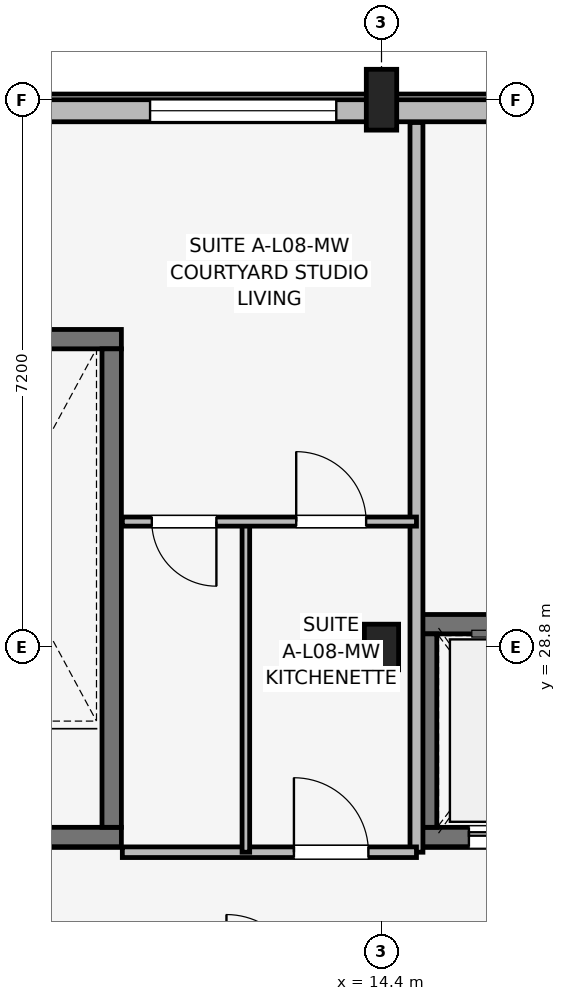
"""IFC4 building model, lengths in metres.
Left out: names, types, materials, properties, quantities, classifications, styles, units other than length and angle.
Written with IfcOpenShell. Run it as: python <this file> out.ifc"""

import sys

from ifc_helpers import new_model, si_unit, direction, frame, frame_2d, origin, origin_2d, place, context, subcontext, project, spatial, rectangle, extrude, element, fill, save


model = new_model("IFC4")
c1 = context("Model", 3, precision=1e-05, world=origin(), true_north=direction((0.0, 1.0)))
c2 = subcontext(c1, "Body", "Model", "MODEL_VIEW")
j1 = project(units=[si_unit("LENGTHUNIT", "METRE"), si_unit("PLANEANGLEUNIT", "RADIAN")], contexts=[c1])
p1 = place(None, origin())
s1 = spatial("IfcSite", under=j1, at=p1, CompositionType="ELEMENT")
p2 = place(p1, origin())
s2 = spatial("IfcBuilding", under=s1, at=p2, CompositionType="ELEMENT")
p3 = place(p2, frame((0.0, 0.0, 27.6)))
s3 = spatial("IfcBuildingStorey", under=s2, at=p3, CompositionType="ELEMENT", Elevation=27.6)
p4 = place(p3, frame((14.4, 28.8, 0.0), z_axis=(0.0, 0.0, 1.0), x_axis=(1.0, 0.0, 0.0)))
e1 = element("IfcColumn", 1, at=p4, inside=s3, PredefinedType="COLUMN", context=c2, shape_type="SweptSolid", body=[
    extrude(rectangle(XDim=0.45, YDim=0.6, at=origin_2d()), origin(), (0.0, 0.0, 1.0), 3.15),
])
p5 = place(p3, frame((14.4, 36.0, 0.0), z_axis=(0.0, 0.0, 1.0), x_axis=(1.0, 0.0, 0.0)))
e2 = element("IfcColumn", 2, at=p5, inside=s3, PredefinedType="COLUMN", context=c2, shape_type="SweptSolid", body=[
    extrude(rectangle(XDim=0.4, YDim=0.8, at=origin_2d()), origin(), (0.0, 0.0, 1.0), 3.15),
])
p6 = place(p3, frame((7.673, 26.3, 0.0), z_axis=(0.0, 0.0, 1.0), x_axis=(1.0, 0.0, 0.0)))
e3 = element("IfcWall", 3, at=p6, inside=s3, PredefinedType="SHEAR", context=c2, shape_type="SweptSolid", body=[
    extrude(rectangle(XDim=3.305, YDim=0.255, at=frame_2d((1.652, 0.0))), origin(), (0.0, 0.0, 1.0), 3.15),
])
p7 = place(p6, frame((2.177, 0.0, 0.0), z_axis=(0.0, 0.0, 1.0), x_axis=(-1.0, 0.0, 0.0)))
e4 = element("IfcOpeningElement", 4, at=p7, cuts=e3, PredefinedType="OPENING", context=c2, shape_type="SweptSolid", body=[
    extrude(rectangle(XDim=1.05, YDim=2.12, at=frame_2d((0.525, 1.06))), frame((0.0, 0.137, 0.0), z_axis=(0.0, -1.0, 0.0), x_axis=(1.0, 0.0, 0.0)), (0.0, 0.0, 1.0), 0.275),
])
p8 = place(p3, frame((7.673, 32.85, 0.0), z_axis=(0.0, 0.0, 1.0), x_axis=(1.0, 0.0, 0.0)))
e5 = element("IfcWall", 5, at=p8, inside=s3, PredefinedType="SHEAR", context=c2, shape_type="SweptSolid", body=[
    extrude(rectangle(XDim=3.305, YDim=0.255, at=frame_2d((1.652, 0.0))), origin(), (0.0, 0.0, 1.0), 3.15),
])
p9 = place(p3, frame((10.85, 26.427, 0.0), z_axis=(0.0, 0.0, 1.0), x_axis=(0.0, 1.0, 0.0)))
e6 = element("IfcWall", 6, at=p9, inside=s3, PredefinedType="SHEAR", context=c2, shape_type="SweptSolid", body=[
    extrude(rectangle(XDim=6.295, YDim=0.255, at=frame_2d((3.147, 0.0))), origin(), (0.0, 0.0, 1.0), 3.15),
])
p10 = place(p3, frame((14.873, 26.3, 0.0), z_axis=(0.0, 0.0, 1.0), x_axis=(1.0, 0.0, 0.0)))
e7 = element("IfcWall", 7, at=p10, inside=s3, PredefinedType="SHEAR", context=c2, shape_type="SweptSolid", body=[
    extrude(rectangle(XDim=2.455, YDim=0.255, at=frame_2d((1.228, 0.0))), origin(), (0.0, 0.0, 1.0), 3.15),
])
p11 = place(p10, frame((0.677, 0.0, 0.0)))
e8 = element("IfcOpeningElement", 8, at=p11, cuts=e7, PredefinedType="OPENING", context=c2, shape_type="SweptSolid", body=[
    extrude(rectangle(XDim=1.1, YDim=2.15, at=frame_2d((0.55, 1.075))), frame((0.0, 0.137, 0.0), z_axis=(0.0, -1.0, 0.0), x_axis=(1.0, 0.0, 0.0)), (0.0, 0.0, 1.0), 0.275),
])
p12 = place(p3, frame((14.873, 29.1, 0.0), z_axis=(0.0, 0.0, 1.0), x_axis=(1.0, 0.0, 0.0)))
e9 = element("IfcWall", 9, at=p12, inside=s3, PredefinedType="SHEAR", context=c2, shape_type="SweptSolid", body=[
    extrude(rectangle(XDim=2.455, YDim=0.255, at=frame_2d((1.228, 0.0))), origin(), (0.0, 0.0, 1.0), 3.15),
])
p13 = place(p3, frame((15.0, 26.427, 0.0), z_axis=(0.0, 0.0, 1.0), x_axis=(0.0, 1.0, 0.0)))
e10 = element("IfcWall", 10, at=p13, inside=s3, PredefinedType="SHEAR", context=c2, shape_type="SweptSolid", body=[
    extrude(rectangle(XDim=2.545, YDim=0.255, at=frame_2d((1.272, 0.0))), origin(), (0.0, 0.0, 1.0), 3.15),
])
p14 = place(p3, frame((33.4, 35.855, 0.0), z_axis=(0.0, 0.0, 1.0), x_axis=(-1.0, 0.0, 0.0)))
e11 = element("IfcWall", 11, at=p14, inside=s3, PredefinedType="SOLIDWALL", context=c2, shape_type="SweptSolid", body=[
    extrude(rectangle(XDim=30.8, YDim=0.29, at=frame_2d((15.4, 0.0))), origin(), (0.0, 0.0, 1.0), 2.43),
])
p15 = place(p14, frame((14.825, 0.0, 0.5)))
e12 = element("IfcOpeningElement", 12, at=p15, cuts=e11, PredefinedType="OPENING", context=c2, shape_type="SweptSolid", body=[
    extrude(rectangle(XDim=1.15, YDim=1.68, at=frame_2d((0.575, 0.84))), frame((0.0, 0.155, 0.0), z_axis=(0.0, -1.0, 0.0), x_axis=(1.0, 0.0, 0.0)), (0.0, 0.0, 1.0), 0.31),
])
p16 = place(p14, frame((1.265, 0.0, 0.67)))
e13 = element("IfcOpeningElement", 13, at=p16, cuts=e11, PredefinedType="OPENING", context=c2, shape_type="SweptSolid", body=[
    extrude(rectangle(XDim=2.0, YDim=1.65, at=frame_2d((1.0, 0.825))), frame((0.0, 0.155, 0.0), z_axis=(0.0, -1.0, 0.0), x_axis=(1.0, 0.0, 0.0)), (0.0, 0.0, 1.0), 0.31),
])
p17 = place(p14, frame((27.46, 0.0, 0.67)))
e14 = element("IfcOpeningElement", 14, at=p17, cuts=e11, PredefinedType="OPENING", context=c2, shape_type="SweptSolid", body=[
    extrude(rectangle(XDim=2.15, YDim=1.65, at=frame_2d((1.075, 0.825))), frame((0.0, 0.155, 0.0), z_axis=(0.0, -1.0, 0.0), x_axis=(1.0, 0.0, 0.0)), (0.0, 0.0, 1.0), 0.31),
])
p18 = place(p14, frame((8.805, 0.0, 0.67)))
e15 = element("IfcOpeningElement", 15, at=p18, cuts=e11, PredefinedType="OPENING", context=c2, shape_type="SweptSolid", body=[
    extrude(rectangle(XDim=2.3, YDim=1.65, at=frame_2d((1.15, 0.825))), frame((0.0, 0.155, 0.0), z_axis=(0.0, -1.0, 0.0), x_axis=(1.0, 0.0, 0.0)), (0.0, 0.0, 1.0), 0.31),
])
p19 = place(p14, frame((19.595, 0.0, 0.67)))
e16 = element("IfcOpeningElement", 16, at=p19, cuts=e11, PredefinedType="OPENING", context=c2, shape_type="SweptSolid", body=[
    extrude(rectangle(XDim=2.45, YDim=1.65, at=frame_2d((1.225, 0.825))), frame((0.0, 0.155, 0.0), z_axis=(0.0, -1.0, 0.0), x_axis=(1.0, 0.0, 0.0)), (0.0, 0.0, 1.0), 0.31),
])
p20 = place(p3, frame((14.86, 26.1, 0.0), z_axis=(0.0, 0.0, 1.0), x_axis=(0.0, 1.0, 0.0)))
e17 = element("IfcWall", 17, at=p20, inside=s3, PredefinedType="PARTITIONING", context=c2, shape_type="SweptSolid", body=[
    extrude(rectangle(XDim=9.6, YDim=0.17, at=frame_2d((4.8, 0.0))), origin(), (0.0, 0.0, 1.0), 2.38),
])
p21 = place(p3, frame((10.99, 26.1, 0.0), z_axis=(0.0, 0.0, 1.0), x_axis=(1.0, 0.0, 0.0)))
e18 = element("IfcWall", 18, at=p21, inside=s3, PredefinedType="PARTITIONING", context=c2, shape_type="SweptSolid", body=[
    extrude(rectangle(XDim=3.87, YDim=0.14, at=frame_2d((1.935, 0.0))), origin(), (0.0, 0.0, 1.0), 2.38),
])
p22 = place(p21, frame((2.258, 0.0, 0.0)))
e19 = element("IfcOpeningElement", 19, at=p22, cuts=e18, PredefinedType="OPENING", context=c2, shape_type="SweptSolid", body=[
    extrude(rectangle(XDim=0.98, YDim=2.1, at=frame_2d((0.49, 1.05))), frame((0.0, 0.08, 0.0), z_axis=(0.0, -1.0, 0.0), x_axis=(1.0, 0.0, 0.0)), (0.0, 0.0, 1.0), 0.16),
])
p23 = place(p3, frame((12.615, 26.1, 0.0), z_axis=(0.0, 0.0, 1.0), x_axis=(0.0, 1.0, 0.0)))
e20 = element("IfcWall", 20, at=p23, inside=s3, PredefinedType="PARTITIONING", context=c2, shape_type="SweptSolid", body=[
    extrude(rectangle(XDim=4.35, YDim=0.1, at=frame_2d((2.175, 0.0))), origin(), (0.0, 0.0, 1.0), 2.38),
])
p24 = place(p3, frame((10.99, 30.45, 0.0), z_axis=(0.0, 0.0, 1.0), x_axis=(1.0, 0.0, 0.0)))
e21 = element("IfcWall", 21, at=p24, inside=s3, PredefinedType="PARTITIONING", context=c2, shape_type="SweptSolid", body=[
    extrude(rectangle(XDim=3.87, YDim=0.12, at=frame_2d((1.935, 0.0))), origin(), (0.0, 0.0, 1.0), 2.38),
])
p25 = place(p24, frame((1.238, 0.0, 0.0), z_axis=(0.0, 0.0, 1.0), x_axis=(-1.0, 0.0, 0.0)))
e22 = element("IfcOpeningElement", 22, at=p25, cuts=e21, PredefinedType="OPENING", context=c2, shape_type="SweptSolid", body=[
    extrude(rectangle(XDim=0.85, YDim=2.08, at=frame_2d((0.425, 1.04))), frame((0.0, 0.07, 0.0), z_axis=(0.0, -1.0, 0.0), x_axis=(1.0, 0.0, 0.0)), (0.0, 0.0, 1.0), 0.14),
])
p26 = place(p24, frame((2.288, 0.0, 0.0)))
e23 = element("IfcOpeningElement", 23, at=p26, cuts=e21, PredefinedType="OPENING", context=c2, shape_type="SweptSolid", body=[
    extrude(rectangle(XDim=0.92, YDim=2.08, at=frame_2d((0.46, 1.04))), frame((0.0, 0.07, 0.0), z_axis=(0.0, -1.0, 0.0), x_axis=(1.0, 0.0, 0.0)), (0.0, 0.0, 1.0), 0.14),
])
p27 = place(p19, origin())
e24 = element("IfcWindow", 24, at=p27, inside=s3, PartitioningType="SINGLE_PANEL", PredefinedType="WINDOW", context=c2, shape_type="SweptSolid", body=[
    extrude(rectangle(XDim=2.45, YDim=1.65, at=frame_2d((1.225, 0.825))), frame((0.0, 0.03, 0.0), z_axis=(0.0, -1.0, 0.0), x_axis=(1.0, 0.0, 0.0)), (0.0, 0.0, 1.0), 0.06),
])
fill(e16, e24)
p28 = place(p22, origin())
e25 = element("IfcDoor", 25, at=p28, inside=s3, OperationType="SINGLE_SWING_LEFT", PredefinedType="DOOR", context=c2, shape_type="SweptSolid", body=[
    extrude(rectangle(XDim=0.98, YDim=2.1, at=frame_2d((0.49, 1.05))), frame((0.0, 0.025, 0.0), z_axis=(0.0, -1.0, 0.0), x_axis=(1.0, 0.0, 0.0)), (0.0, 0.0, 1.0), 0.05),
])
fill(e19, e25)
p29 = place(p25, origin())
e26 = element("IfcDoor", 26, at=p29, inside=s3, OperationType="SINGLE_SWING_RIGHT", PredefinedType="DOOR", context=c2, shape_type="SweptSolid", body=[
    extrude(rectangle(XDim=0.85, YDim=2.08, at=frame_2d((0.425, 1.04))), frame((0.0, 0.025, 0.0), z_axis=(0.0, -1.0, 0.0), x_axis=(1.0, 0.0, 0.0)), (0.0, 0.0, 1.0), 0.05),
])
fill(e22, e26)
p30 = place(p26, origin())
e27 = element("IfcDoor", 27, at=p30, inside=s3, OperationType="SINGLE_SWING_LEFT", PredefinedType="DOOR", context=c2, shape_type="SweptSolid", body=[
    extrude(rectangle(XDim=0.92, YDim=2.08, at=frame_2d((0.46, 1.04))), frame((0.0, 0.025, 0.0), z_axis=(0.0, -1.0, 0.0), x_axis=(1.0, 0.0, 0.0)), (0.0, 0.0, 1.0), 0.05),
])
fill(e23, e27)
p31 = place(p11, origin())
e28 = element("IfcDoor", 28, at=p31, inside=s3, OperationType="SLIDING_TO_LEFT", PredefinedType="DOOR", context=c2, shape_type="SweptSolid", body=[
    extrude(rectangle(XDim=1.1, YDim=2.15, at=frame_2d((0.55, 1.075))), frame((0.0, 0.025, 0.0), z_axis=(0.0, -1.0, 0.0), x_axis=(1.0, 0.0, 0.0)), (0.0, 0.0, 1.0), 0.05),
])
fill(e8, e28)
save(model, sys.argv[1])
